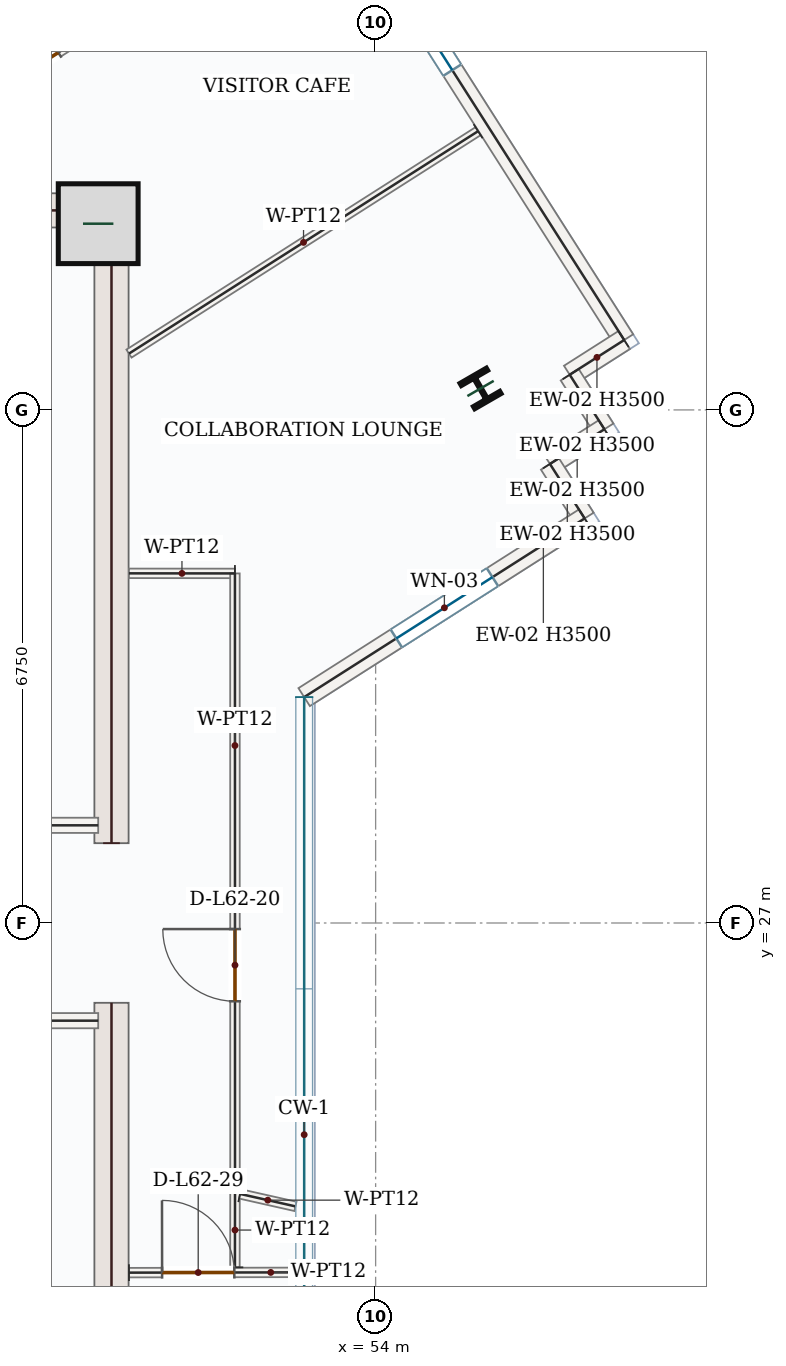
"""IFC4 building model, lengths in metres.
Left out: names, types, materials, properties, quantities, classifications, styles, units other than length and angle.
Written with IfcOpenShell. Run it as: python <this file> out.ifc"""

import sys

from ifc_helpers import new_model, si_unit, direction, frame, frame_2d, origin, origin_2d, place, context, subcontext, project, spatial, rectangle, i_section, extrude, source, transform, mapped, element, fill, save


model = new_model("IFC4")
c1 = context("Model", 3, precision=1e-05, world=origin(), true_north=direction((0.0, 1.0)))
c2 = subcontext(c1, "Body", "Model", "MODEL_VIEW")
j1 = project(units=[si_unit("LENGTHUNIT", "METRE"), si_unit("PLANEANGLEUNIT", "RADIAN")], contexts=[c1])
p1 = place(None, origin())
s1 = spatial("IfcSite", under=j1, at=p1, CompositionType="ELEMENT")
p2 = place(p1, origin())
s2 = spatial("IfcBuilding", under=s1, at=p2, CompositionType="ELEMENT")
p3 = place(p2, frame((0.0, 0.0, 261.6)))
s3 = spatial("IfcBuildingStorey", under=s2, at=p3, CompositionType="ELEMENT", Elevation=261.6)
m1 = source(origin(), c2, "Body", "SweptSolid", [
    extrude(rectangle(XDim=8.55, YDim=0.45, at=frame_2d((4.275, 0.0))), origin(), (0.0, 0.0, 1.0), 3.5),
])
for number, where, z_axis, x_axis in (
    (1, (50.525, 17.4, 0.0), (0.0, 0.0, 1.0), (0.0, 1.0, 0.0)),
    (2, (50.525, 28.05, 0.0), (0.0, 0.0, 1.0), (0.0, 1.0, 0.0)),
):
    element("IfcWall", number, at=place(p3, frame(where, z_axis=z_axis, x_axis=x_axis)), inside=s3, PredefinedType="SHEAR", context=c2, shape_type="MappedRepresentation", body=[
        mapped(m1, transform((0.0, 0.0, 0.0), x_axis=(1.0, 0.0, 0.0), y_axis=(0.0, 1.0, 0.0), z_axis=(0.0, 0.0, 1.0), scale=1.0)),
    ])
m2 = source(origin(), c2, "Body", "SweptSolid", [
    extrude(rectangle(XDim=7.1, YDim=0.45, at=frame_2d((3.55, 0.0))), origin(), (0.0, 0.0, 1.0), 3.5),
])
p4 = place(p3, frame((43.2, 36.375, 0.0), z_axis=(0.0, 0.0, 1.0), x_axis=(1.0, 0.0, 0.0)))
e3 = element("IfcWall", 3, at=p4, inside=s3, PredefinedType="SHEAR", context=c2, shape_type="MappedRepresentation", body=[
    mapped(m2, transform((0.0, 0.0, 0.0), x_axis=(1.0, 0.0, 0.0), y_axis=(0.0, 1.0, 0.0), z_axis=(0.0, 0.0, 1.0), scale=1.0)),
])
m3 = source(origin(), c2, "Body", "SweptSolid", [
    extrude(rectangle(XDim=1.05, YDim=1.05, at=origin_2d()), origin(), (0.0, 0.0, 1.0), 3.75),
])
p5 = place(p3, frame((50.35, 36.2, 0.0), z_axis=(0.0, 0.0, 1.0), x_axis=(1.0, 0.0, 0.0)))
e4 = element("IfcColumn", 4, at=p5, inside=s3, PredefinedType="COLUMN", context=c2, shape_type="MappedRepresentation", body=[
    mapped(m3, transform((0.0, 0.0, 0.0), x_axis=(1.0, 0.0, 0.0), y_axis=(0.0, 1.0, 0.0), z_axis=(0.0, 0.0, 1.0), scale=1.0)),
])
m4 = source(origin(), c2, "Body", "SweptSolid", [
    extrude(i_section(OverallWidth=0.399, OverallDepth=0.386, WebThickness=0.021, FlangeThickness=0.033, FilletRadius=0.018, at=origin_2d()), origin(), (0.0, 0.0, 1.0), 3.75),
])
p6 = place(p3, frame((55.38, 34.032, 0.0), z_axis=(0.0, 0.0, 1.0), x_axis=(0.866025403784, 0.5, 0.0)))
e5 = element("IfcColumn", 5, at=p6, inside=s3, PredefinedType="COLUMN", context=c2, shape_type="MappedRepresentation", body=[
    mapped(m4, transform((0.0, 0.0, 0.0), x_axis=(1.0, 0.0, 0.0), y_axis=(0.0, 1.0, 0.0), z_axis=(0.0, 0.0, 1.0), scale=1.0)),
])
p7 = place(p3, frame((51.94, 43.036, 0.0), z_axis=(0.0, 0.0, 1.0), x_axis=(0.537314949054, -0.843381672508, 0.0)))
e6 = element("IfcWall", 6, at=p7, inside=s3, PredefinedType="SOLIDWALL", context=c2, shape_type="SweptSolid", body=[
    extrude(rectangle(XDim=9.92, YDim=0.28, at=frame_2d((4.96, 0.0))), origin(), (0.0, 0.0, 1.0), 3.5),
])
p8 = place(p7, frame((4.21, 0.0, 0.85)))
e7 = element("IfcOpeningElement", 7, at=p8, cuts=e6, PredefinedType="OPENING", context=c2, shape_type="SweptSolid", body=[
    extrude(rectangle(XDim=1.5, YDim=1.5, at=frame_2d((0.75, 0.75))), frame((0.0, 0.15, 0.0), z_axis=(0.0, -1.0, 0.0), x_axis=(1.0, 0.0, 0.0)), (0.0, 0.0, 1.0), 0.3),
])
m5 = source(origin(), c2, "Body", "SweptSolid", [
    extrude(rectangle(XDim=0.85, YDim=0.28, at=frame_2d((0.425, 0.0))), origin(), (0.0, 0.0, 1.0), 3.5),
])
p9 = place(p3, frame((57.27, 34.67, 0.0), z_axis=(0.0, 0.0, 1.0), x_axis=(-0.843401251716, -0.537284215853, 0.0)))
e8 = element("IfcWall", 8, at=p9, inside=s3, PredefinedType="SOLIDWALL", context=c2, shape_type="MappedRepresentation", body=[
    mapped(m5, transform((0.0, 0.0, 0.0), x_axis=(1.0, 0.0, 0.0), y_axis=(0.0, 1.0, 0.0), z_axis=(0.0, 0.0, 1.0), scale=1.0)),
])
m6 = source(origin(), c2, "Body", "SweptSolid", [
    extrude(rectangle(XDim=0.85, YDim=0.28, at=frame_2d((0.425, 0.0))), origin(), (0.0, 0.0, 1.0), 3.5),
])
for number, where, z_axis, x_axis in (
    (9, (56.553, 34.213, 0.0), (0.0, 0.0, 1.0), (0.537, -0.843, 0.0)),
    (10, (57.01, 33.496, 0.0), (0.0, 0.0, 1.0), (-0.843, -0.537, 0.0)),
    (11, (56.293, 33.039, 0.0), (0.0, 0.0, 1.0), (0.537, -0.843, 0.0)),
):
    element("IfcWall", number, at=place(p3, frame(where, z_axis=z_axis, x_axis=x_axis)), inside=s3, PredefinedType="SOLIDWALL", context=c2, shape_type="MappedRepresentation", body=[
        mapped(m6, transform((0.0, 0.0, 0.0), x_axis=(1.0, 0.0, 0.0), y_axis=(0.0, 1.0, 0.0), z_axis=(0.0, 0.0, 1.0), scale=1.0)),
    ])
p10 = place(p3, frame((56.75, 32.323, 0.0), z_axis=(0.0, 0.0, 1.0), x_axis=(-0.843383352012, -0.537312312857, 0.0)))
e12 = element("IfcWall", 12, at=p10, inside=s3, PredefinedType="SOLIDWALL", context=c2, shape_type="SweptSolid", body=[
    extrude(rectangle(XDim=4.375, YDim=0.28, at=frame_2d((2.188, 0.0))), origin(), (0.0, 0.0, 1.0), 3.5),
])
p11 = place(p10, frame((1.438, 0.0, 0.85)))
e13 = element("IfcOpeningElement", 13, at=p11, cuts=e12, PredefinedType="OPENING", context=c2, shape_type="SweptSolid", body=[
    extrude(rectangle(XDim=1.5, YDim=1.5, at=frame_2d((0.75, 0.75))), frame((0.0, 0.15, 0.0), z_axis=(0.0, -1.0, 0.0), x_axis=(1.0, 0.0, 0.0)), (0.0, 0.0, 1.0), 0.3),
])
m7 = source(origin(), c2, "Body", "SweptSolid", [
    extrude(rectangle(XDim=4.25, YDim=0.2, at=frame_2d((2.125, 0.0))), origin(), (0.0, 0.0, 1.0), 3.5),
])
for number, where, z_axis, x_axis in (
    (14, (46.1, 25.715, 0.0), (0.0, 0.0, 1.0), (1.0, 0.0, 0.0)),
    (15, (46.1, 28.285, 0.0), (0.0, 0.0, 1.0), (1.0, 0.0, 0.0)),
):
    element("IfcWall", number, at=place(p3, frame(where, z_axis=z_axis, x_axis=x_axis)), inside=s3, PredefinedType="SOLIDWALL", context=c2, shape_type="MappedRepresentation", body=[
        mapped(m7, transform((0.0, 0.0, 0.0), x_axis=(1.0, 0.0, 0.0), y_axis=(0.0, 1.0, 0.0), z_axis=(0.0, 0.0, 1.0), scale=1.0)),
    ])
p12 = place(p3, frame((46.927, 36.605, 0.0), z_axis=(0.0, 0.0, 1.0), x_axis=(0.843398332862, 0.537288797693, 0.0)))
e16 = element("IfcWall", 16, at=p12, inside=s3, PredefinedType="PARTITIONING", context=c2, shape_type="SweptSolid", body=[
    extrude(rectangle(XDim=5.924, YDim=0.125, at=frame_2d((2.962, 0.0))), origin(), (0.0, 0.0, 1.0), 3.5),
])
p13 = place(p12, frame((2.487, 0.0, 0.0)))
e17 = element("IfcOpeningElement", 17, at=p13, cuts=e16, PredefinedType="OPENING", context=c2, shape_type="SweptSolid", body=[
    extrude(rectangle(XDim=0.95, YDim=2.15, at=frame_2d((0.475, 1.075))), frame((0.0, 0.073, 0.0), z_axis=(0.0, -1.0, 0.0), x_axis=(1.0, 0.0, 0.0)), (0.0, 0.0, 1.0), 0.145),
])
m8 = source(origin(), c2, "Body", "SweptSolid", [
    extrude(rectangle(XDim=5.446, YDim=0.125, at=frame_2d((2.723, 0.0))), origin(), (0.0, 0.0, 1.0), 3.5),
])
p14 = place(p3, frame((55.348, 37.417, 0.0), z_axis=(0.0, 0.0, 1.0), x_axis=(-0.843395566027, -0.537293140851, 0.0)))
e18 = element("IfcWall", 18, at=p14, inside=s3, PredefinedType="PARTITIONING", context=c2, shape_type="MappedRepresentation", body=[
    mapped(m8, transform((0.0, 0.0, 0.0), x_axis=(1.0, 0.0, 0.0), y_axis=(0.0, 1.0, 0.0), z_axis=(0.0, 0.0, 1.0), scale=1.0)),
])
p15 = place(p3, frame((50.755, 22.4, 0.0), z_axis=(0.0, 0.0, 1.0), x_axis=(0.999998787702, 0.001557110781, 0.0)))
e19 = element("IfcWall", 19, at=p15, inside=s3, PredefinedType="PARTITIONING", context=c2, shape_type="SweptSolid", body=[
    extrude(rectangle(XDim=2.195, YDim=0.125, at=frame_2d((1.098, 0.0))), origin(), (0.0, 0.0, 1.0), 3.5),
])
p16 = place(p15, frame((0.436, 0.0, 0.0)))
e20 = element("IfcOpeningElement", 20, at=p16, cuts=e19, PredefinedType="OPENING", context=c2, shape_type="SweptSolid", body=[
    extrude(rectangle(XDim=0.95, YDim=2.15, at=frame_2d((0.475, 1.075))), frame((0.0, 0.073, 0.0), z_axis=(0.0, -1.0, 0.0), x_axis=(1.0, 0.0, 0.0)), (0.0, 0.0, 1.0), 0.145),
])
m9 = source(origin(), c2, "Body", "SweptSolid", [
    extrude(rectangle(XDim=0.981, YDim=0.125, at=frame_2d((0.491, 0.0))), origin(), (0.0, 0.0, 1.0), 3.5),
])
p17 = place(p3, frame((52.149, 22.47, 0.0), z_axis=(0.0, 0.0, 1.0), x_axis=(0.001244089607, 0.99999922612, 0.0)))
e21 = element("IfcWall", 21, at=p17, inside=s3, PredefinedType="PARTITIONING", context=c2, shape_type="MappedRepresentation", body=[
    mapped(m9, transform((0.0, 0.0, 0.0), x_axis=(1.0, 0.0, 0.0), y_axis=(0.0, 1.0, 0.0), z_axis=(0.0, 0.0, 1.0), scale=1.0)),
])
m10 = source(origin(), c2, "Body", "SweptSolid", [
    extrude(rectangle(XDim=0.746, YDim=0.125, at=frame_2d((0.373, 0.0))), origin(), (0.0, 0.0, 1.0), 3.5),
])
p18 = place(p3, frame((52.218, 23.436, 0.0), z_axis=(0.0, 0.0, 1.0), x_axis=(0.975574688732, -0.219667991993, 0.0)))
e22 = element("IfcWall", 22, at=p18, inside=s3, PredefinedType="PARTITIONING", context=c2, shape_type="MappedRepresentation", body=[
    mapped(m10, transform((0.0, 0.0, 0.0), x_axis=(1.0, 0.0, 0.0), y_axis=(0.0, 1.0, 0.0), z_axis=(0.0, 0.0, 1.0), scale=1.0)),
])
m11 = source(origin(), c2, "Body", "SweptSolid", [
    extrude(rectangle(XDim=1.394, YDim=0.125, at=frame_2d((0.697, 0.0))), origin(), (0.0, 0.0, 1.0), 3.5),
])
p19 = place(p3, frame((52.149, 31.599, 0.0), z_axis=(0.0, 0.0, 1.0), x_axis=(-0.999999754632, 0.000700525222, 0.0)))
e23 = element("IfcWall", 23, at=p19, inside=s3, PredefinedType="PARTITIONING", context=c2, shape_type="MappedRepresentation", body=[
    mapped(m11, transform((0.0, 0.0, 0.0), x_axis=(1.0, 0.0, 0.0), y_axis=(0.0, 1.0, 0.0), z_axis=(0.0, 0.0, 1.0), scale=1.0)),
])
p20 = place(p3, frame((52.15, 23.451, 0.0), z_axis=(0.0, 0.0, 1.0), x_axis=(-0.000119850186, 0.999999992818, 0.0)))
e24 = element("IfcWall", 24, at=p20, inside=s3, PredefinedType="PARTITIONING", context=c2, shape_type="SweptSolid", body=[
    extrude(rectangle(XDim=8.148, YDim=0.125, at=frame_2d((4.074, 0.0))), origin(), (0.0, 0.0, 1.0), 3.5),
])
p21 = place(p20, frame((2.519, 0.0, 0.0)))
e25 = element("IfcOpeningElement", 25, at=p21, cuts=e24, PredefinedType="OPENING", context=c2, shape_type="SweptSolid", body=[
    extrude(rectangle(XDim=0.95, YDim=2.15, at=frame_2d((0.475, 1.075))), frame((0.0, 0.073, 0.0), z_axis=(0.0, -1.0, 0.0), x_axis=(1.0, 0.0, 0.0)), (0.0, 0.0, 1.0), 0.145),
])
m12 = source(origin(), c2, "Body", "SweptSolid", [
    extrude(rectangle(XDim=1.5, YDim=1.5, at=frame_2d((0.75, 0.75))), frame((0.0, 0.03, 0.0), z_axis=(0.0, -1.0, 0.0), x_axis=(1.0, 0.0, 0.0)), (0.0, 0.0, 1.0), 0.06),
])
p22 = place(p8, origin())
e26 = element("IfcWindow", 26, at=p22, inside=s3, PartitioningType="SINGLE_PANEL", PredefinedType="WINDOW", context=c2, shape_type="MappedRepresentation", body=[
    mapped(m12, transform((0.0, 0.0, 0.0), x_axis=(1.0, 0.0, 0.0), y_axis=(0.0, 1.0, 0.0), z_axis=(0.0, 0.0, 1.0), scale=1.0)),
])
fill(e7, e26)
p23 = place(p11, origin())
e27 = element("IfcWindow", 27, at=p23, inside=s3, PartitioningType="SINGLE_PANEL", PredefinedType="WINDOW", context=c2, shape_type="MappedRepresentation", body=[
    mapped(m12, transform((0.0, 0.0, 0.0), x_axis=(1.0, 0.0, 0.0), y_axis=(0.0, 1.0, 0.0), z_axis=(0.0, 0.0, 1.0), scale=1.0)),
])
fill(e13, e27)
m13 = source(origin(), c2, "Body", "SweptSolid", [
    extrude(rectangle(XDim=0.95, YDim=2.15, at=frame_2d((0.475, 1.075))), frame((0.0, 0.025, 0.0), z_axis=(0.0, -1.0, 0.0), x_axis=(1.0, 0.0, 0.0)), (0.0, 0.0, 1.0), 0.05),
])
p24 = place(p21, origin())
e28 = element("IfcDoor", 28, at=p24, inside=s3, OperationType="SINGLE_SWING_RIGHT", PredefinedType="DOOR", context=c2, shape_type="MappedRepresentation", body=[
    mapped(m13, transform((0.0, 0.0, 0.0), x_axis=(1.0, 0.0, 0.0), y_axis=(0.0, 1.0, 0.0), z_axis=(0.0, 0.0, 1.0), scale=1.0)),
])
fill(e25, e28)
p25 = place(p16, origin())
e29 = element("IfcDoor", 29, at=p25, inside=s3, OperationType="SINGLE_SWING_LEFT", PredefinedType="DOOR", context=c2, shape_type="MappedRepresentation", body=[
    mapped(m13, transform((0.0, 0.0, 0.0), x_axis=(1.0, 0.0, 0.0), y_axis=(0.0, 1.0, 0.0), z_axis=(0.0, 0.0, 1.0), scale=1.0)),
])
fill(e20, e29)
p26 = place(p13, origin())
e30 = element("IfcDoor", 30, at=p26, inside=s3, OperationType="SINGLE_SWING_LEFT", PredefinedType="DOOR", context=c2, shape_type="MappedRepresentation", body=[
    mapped(m13, transform((0.0, 0.0, 0.0), x_axis=(1.0, 0.0, 0.0), y_axis=(0.0, 1.0, 0.0), z_axis=(0.0, 0.0, 1.0), scale=1.0)),
])
fill(e17, e30)
save(model, sys.argv[1])
